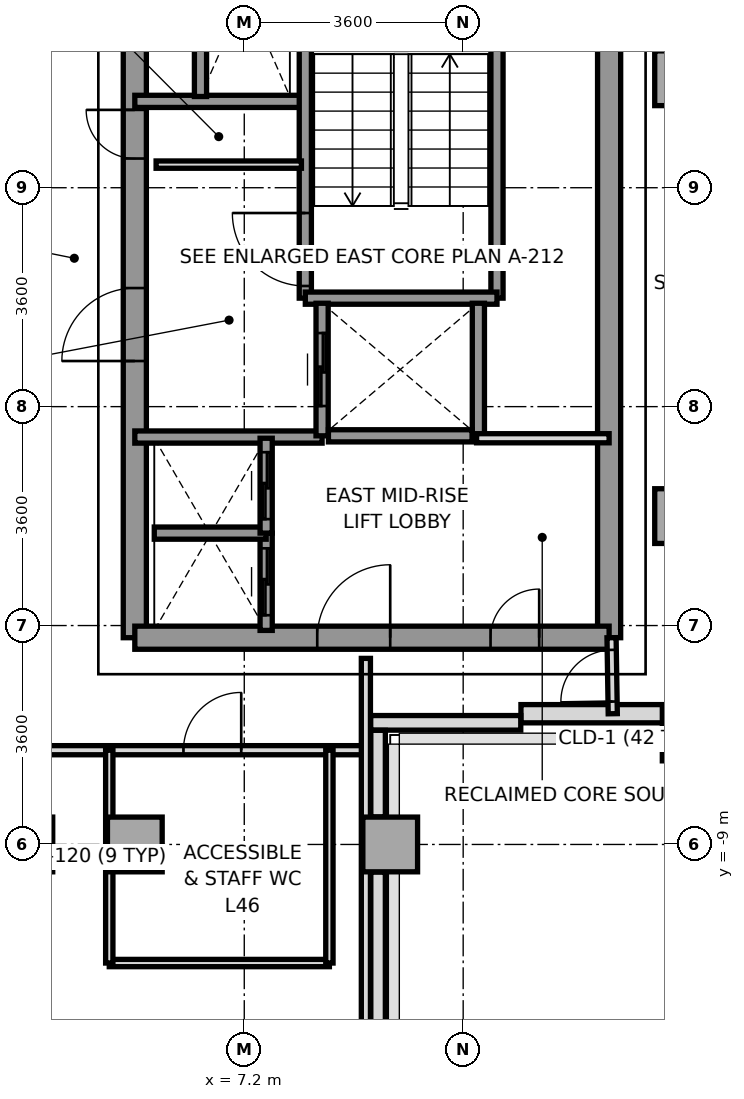
"""IFC4 building model, lengths in metres.
Left out: names, types, materials, properties, quantities, classifications, styles, units other than length and angle.
Written with IfcOpenShell. Run it as: python <this file> out.ifc"""

import sys

from ifc_helpers import new_model, si_unit, direction, frame, frame_2d, origin, origin_2d, place, context, subcontext, project, spatial, rectangle, extrude, source, transform, mapped, element, fill, save


model = new_model("IFC4")
c1 = context("Model", 3, precision=1e-05, world=origin(), true_north=direction((0.0, 1.0)))
c2 = subcontext(c1, "Body", "Model", "MODEL_VIEW")
j1 = project(units=[si_unit("LENGTHUNIT", "METRE"), si_unit("PLANEANGLEUNIT", "RADIAN")], contexts=[c1])
p1 = place(None, origin())
s1 = spatial("IfcSite", under=j1, at=p1, CompositionType="ELEMENT")
p2 = place(p1, origin())
s2 = spatial("IfcBuilding", under=s1, at=p2, CompositionType="ELEMENT")
p3 = place(p2, frame((0.0, 0.0, 170.6)))
s3 = spatial("IfcBuildingStorey", under=s2, at=p3, CompositionType="ELEMENT", Elevation=170.6)
m1 = source(origin(), c2, "Body", "SweptSolid", [
    extrude(rectangle(XDim=0.9, YDim=0.9, at=origin_2d()), origin(), (0.0, 0.0, 1.0), 3.2),
])
for number, where, z_axis, x_axis in (
    (1, (5.4, -9.0, 0.0), (0.0, 0.0, 1.0), (1.0, 0.0, 0.0)),
    (2, (9.6, -9.0, 0.0), (0.0, 0.0, 1.0), (1.0, 0.0, 0.0)),
):
    element("IfcColumn", number, at=place(p3, frame(where, z_axis=z_axis, x_axis=x_axis)), inside=s3, PredefinedType="COLUMN", context=c2, shape_type="MappedRepresentation", body=[
        mapped(m1, transform((0.0, 0.0, 0.0), x_axis=(1.0, 0.0, 0.0), y_axis=(0.0, 1.0, 0.0), z_axis=(0.0, 0.0, 1.0), scale=1.0)),
    ])
m2 = source(origin(), c2, "Body", "SweptSolid", [
    extrude(rectangle(XDim=0.65, YDim=0.85, at=origin_2d()), origin(), (0.0, 0.0, 1.0), 3.2),
])
p4 = place(p3, frame((14.4, -7.2, 0.0), z_axis=(0.0, 0.0, 1.0), x_axis=(1.0, 0.0, 0.0)))
e3 = element("IfcColumn", 3, at=p4, inside=s3, PredefinedType="COLUMN", context=c2, shape_type="MappedRepresentation", body=[
    mapped(m2, transform((0.0, 0.0, 0.0), x_axis=(1.0, 0.0, 0.0), y_axis=(0.0, 1.0, 0.0), z_axis=(0.0, 0.0, 1.0), scale=1.0)),
])
for number, where, z_axis, x_axis in (
    (4, (14.4, -3.6, 0.0), (0.0, 0.0, 1.0), (1.0, 0.0, 0.0)),
    (5, (14.4, 3.6, 0.0), (0.0, 0.0, 1.0), (1.0, 0.0, 0.0)),
):
    element("IfcColumn", number, at=place(p3, frame(where, z_axis=z_axis, x_axis=x_axis)), inside=s3, PredefinedType="COLUMN", context=c2, shape_type="MappedRepresentation", body=[
        mapped(m1, transform((0.0, 0.0, 0.0), x_axis=(1.0, 0.0, 0.0), y_axis=(0.0, 1.0, 0.0), z_axis=(0.0, 0.0, 1.0), scale=1.0)),
    ])
p5 = place(p3, frame((11.75, -6.85, 0.0), z_axis=(0.0, 0.0, 1.0), x_axis=(1.0, 0.0, 0.0)))
e6 = element("IfcWall", 6, at=p5, inside=s3, PredefinedType="SOLIDWALL", context=c2, shape_type="SweptSolid", body=[
    extrude(rectangle(XDim=2.333, YDim=0.3, at=frame_2d((1.167, 0.0))), origin(), (0.0, 0.0, 1.0), 3.2),
])
p6 = place(p3, frame((11.747, -7.0, 0.0), z_axis=(0.0, 0.0, 1.0), x_axis=(-1.0, 0.0, 0.0)))
e7 = element("IfcWall", 7, at=p6, inside=s3, PredefinedType="PARAPET", context=c2, shape_type="SweptSolid", body=[
    extrude(rectangle(XDim=2.469, YDim=0.24, at=frame_2d((1.234, 0.0))), origin(), (0.0, 0.0, 1.0), 1.15),
])
p7 = place(p3, frame((9.4, -7.123, 0.0), z_axis=(0.0, 0.0, 1.0), x_axis=(0.0, -1.0, 0.0)))
e8 = element("IfcWall", 8, at=p7, inside=s3, PredefinedType="PARAPET", context=c2, shape_type="SweptSolid", body=[
    extrude(rectangle(XDim=1.424, YDim=0.24, at=frame_2d((0.712, 0.0))), origin(), (0.0, 0.0, 1.0), 1.15),
])
p8 = place(p3, frame((9.4, -9.453, 0.0), z_axis=(0.0, 0.0, 1.0), x_axis=(0.0, -1.0, 0.0)))
e9 = element("IfcWall", 9, at=p8, inside=s3, PredefinedType="PARAPET", context=c2, shape_type="SweptSolid", body=[
    extrude(rectangle(XDim=6.15, YDim=0.24, at=frame_2d((3.075, 0.0))), origin(), (0.0, 0.0, 1.0), 1.15),
])
p9 = place(p3, frame((13.2, -5.6, 0.0), z_axis=(0.0, 0.0, 1.0), x_axis=(0.0, 1.0, 0.0)))
e10 = element("IfcWall", 10, at=p9, inside=s3, PredefinedType="SHEAR", context=c2, shape_type="SweptSolid", body=[
    extrude(rectangle(XDim=11.2, YDim=0.38, at=frame_2d((5.6, 0.0))), origin(), (0.0, 0.0, 1.0), 3.2),
])
p10 = place(p3, frame((5.4, -5.6, 0.0), z_axis=(0.0, 0.0, 1.0), x_axis=(0.0, 1.0, 0.0)))
e11 = element("IfcWall", 11, at=p10, inside=s3, PredefinedType="SHEAR", context=c2, shape_type="SweptSolid", body=[
    extrude(rectangle(XDim=12.5, YDim=0.38, at=frame_2d((6.25, 0.0))), origin(), (0.0, 0.0, 1.0), 3.2),
])
p11 = place(p10, frame((4.55, 0.0, 0.0)))
e12 = element("IfcOpeningElement", 12, at=p11, cuts=e11, PredefinedType="OPENING", context=c2, shape_type="SweptSolid", body=[
    extrude(rectangle(XDim=1.2, YDim=2.2, at=frame_2d((0.6, 1.1))), frame((0.0, 0.2, 0.0), z_axis=(0.0, -1.0, 0.0), x_axis=(1.0, 0.0, 0.0)), (0.0, 0.0, 1.0), 0.4),
])
p12 = place(p10, frame((7.88, 0.0, 0.0)))
e13 = element("IfcOpeningElement", 13, at=p12, cuts=e11, PredefinedType="OPENING", context=c2, shape_type="SweptSolid", body=[
    extrude(rectangle(XDim=0.8, YDim=2.1, at=frame_2d((0.4, 1.05))), frame((0.0, 0.2, 0.0), z_axis=(0.0, -1.0, 0.0), x_axis=(1.0, 0.0, 0.0)), (0.0, 0.0, 1.0), 0.4),
])
p13 = place(p3, frame((5.4, -5.6, 0.0), z_axis=(0.0, 0.0, 1.0), x_axis=(1.0, 0.0, 0.0)))
e14 = element("IfcWall", 14, at=p13, inside=s3, PredefinedType="SHEAR", context=c2, shape_type="SweptSolid", body=[
    extrude(rectangle(XDim=7.8, YDim=0.38, at=frame_2d((3.9, 0.0))), origin(), (0.0, 0.0, 1.0), 3.2),
])
p14 = place(p13, frame((3.0, 0.0, 0.0)))
e15 = element("IfcOpeningElement", 15, at=p14, cuts=e14, PredefinedType="OPENING", context=c2, shape_type="SweptSolid", body=[
    extrude(rectangle(XDim=1.2, YDim=2.2, at=frame_2d((0.6, 1.1))), frame((0.0, 0.2, 0.0), z_axis=(0.0, -1.0, 0.0), x_axis=(1.0, 0.0, 0.0)), (0.0, 0.0, 1.0), 0.4),
])
p15 = place(p13, frame((5.85, 0.0, 0.0)))
e16 = element("IfcOpeningElement", 16, at=p15, cuts=e14, PredefinedType="OPENING", context=c2, shape_type="SweptSolid", body=[
    extrude(rectangle(XDim=0.8, YDim=2.1, at=frame_2d((0.4, 1.05))), frame((0.0, 0.2, 0.0), z_axis=(0.0, -1.0, 0.0), x_axis=(1.0, 0.0, 0.0)), (0.0, 0.0, 1.0), 0.4),
])
p16 = place(p3, frame((5.4, 3.22, 0.0), z_axis=(0.0, 0.0, 1.0), x_axis=(1.0, 0.0, 0.0)))
e17 = element("IfcWall", 17, at=p16, inside=s3, PredefinedType="SOLIDWALL", context=c2, shape_type="SweptSolid", body=[
    extrude(rectangle(XDim=2.78, YDim=0.2, at=frame_2d((1.39, 0.0))), origin(), (0.0, 0.0, 1.0), 3.2),
])
p17 = place(p3, frame((5.4, -2.3, 0.0), z_axis=(0.0, 0.0, 1.0), x_axis=(1.0, 0.0, 0.0)))
e18 = element("IfcWall", 18, at=p17, inside=s3, PredefinedType="SOLIDWALL", context=c2, shape_type="SweptSolid", body=[
    extrude(rectangle(XDim=3.08, YDim=0.2, at=frame_2d((1.54, 0.0))), origin(), (0.0, 0.0, 1.0), 3.2),
])
p18 = place(p3, frame((8.204, -0.016, 0.0), z_axis=(0.0, 0.0, 1.0), x_axis=(0.0, 1.0, 0.0)))
e19 = element("IfcWall", 19, at=p18, inside=s3, PredefinedType="SOLIDWALL", context=c2, shape_type="SweptSolid", body=[
    extrude(rectangle(XDim=6.916, YDim=0.2, at=frame_2d((3.458, 0.0))), origin(), (0.0, 0.0, 1.0), 3.2),
])
p19 = place(p18, frame((0.2, 0.0, 0.0)))
e20 = element("IfcOpeningElement", 20, at=p19, cuts=e19, PredefinedType="OPENING", context=c2, shape_type="SweptSolid", body=[
    extrude(rectangle(XDim=1.2, YDim=2.2, at=frame_2d((0.6, 1.1))), frame((0.0, 0.11, 0.0), z_axis=(0.0, -1.0, 0.0), x_axis=(1.0, 0.0, 0.0)), (0.0, 0.0, 1.0), 0.22),
])
p20 = place(p3, frame((11.356, -0.016, 0.0), z_axis=(0.0, 0.0, 1.0), x_axis=(0.0, 1.0, 0.0)))
e21 = element("IfcWall", 21, at=p20, inside=s3, PredefinedType="SOLIDWALL", context=c2, shape_type="SweptSolid", body=[
    extrude(rectangle(XDim=6.916, YDim=0.2, at=frame_2d((3.458, 0.0))), origin(), (0.0, 0.0, 1.0), 3.2),
])
p21 = place(p3, frame((8.204, -0.016, 0.0), z_axis=(0.0, 0.0, 1.0), x_axis=(1.0, 0.0, 0.0)))
e22 = element("IfcWall", 22, at=p21, inside=s3, PredefinedType="SOLIDWALL", context=c2, shape_type="SweptSolid", body=[
    extrude(rectangle(XDim=3.152, YDim=0.2, at=frame_2d((1.576, 0.0))), origin(), (0.0, 0.0, 1.0), 3.2),
])
p22 = place(p3, frame((8.48, -2.28, 0.0), z_axis=(0.0, 0.0, 1.0), x_axis=(0.0, 1.0, 0.0)))
e23 = element("IfcWall", 23, at=p22, inside=s3, PredefinedType="SOLIDWALL", context=c2, shape_type="SweptSolid", body=[
    extrude(rectangle(XDim=2.18, YDim=0.2, at=frame_2d((1.09, 0.0))), origin(), (0.0, 0.0, 1.0), 3.2),
])
p23 = place(p22, frame((0.49, 0.0, 0.0)))
e24 = element("IfcOpeningElement", 24, at=p23, cuts=e23, PredefinedType="OPENING", context=c2, shape_type="SweptSolid", body=[
    extrude(rectangle(XDim=1.2, YDim=2.2, at=frame_2d((0.6, 1.1))), frame((0.0, 0.11, 0.0), z_axis=(0.0, -1.0, 0.0), x_axis=(1.0, 0.0, 0.0)), (0.0, 0.0, 1.0), 0.22),
])
p24 = place(p3, frame((11.05, -2.28, 0.0), z_axis=(0.0, 0.0, 1.0), x_axis=(0.0, 1.0, 0.0)))
e25 = element("IfcWall", 25, at=p24, inside=s3, PredefinedType="SOLIDWALL", context=c2, shape_type="SweptSolid", body=[
    extrude(rectangle(XDim=2.18, YDim=0.2, at=frame_2d((1.09, 0.0))), origin(), (0.0, 0.0, 1.0), 3.2),
])
p25 = place(p3, frame((8.584, -2.28, 0.0), z_axis=(0.0, 0.0, 1.0), x_axis=(1.0, 0.0, 0.0)))
e26 = element("IfcWall", 26, at=p25, inside=s3, PredefinedType="SOLIDWALL", context=c2, shape_type="SweptSolid", body=[
    extrude(rectangle(XDim=2.362, YDim=0.2, at=frame_2d((1.181, 0.0))), origin(), (0.0, 0.0, 1.0), 3.2),
])
p26 = place(p3, frame((7.56, -5.48, 0.0), z_axis=(0.0, 0.0, 1.0), x_axis=(0.0, 1.0, 0.0)))
e27 = element("IfcWall", 27, at=p26, inside=s3, PredefinedType="SOLIDWALL", context=c2, shape_type="SweptSolid", body=[
    extrude(rectangle(XDim=1.6, YDim=0.2, at=frame_2d((0.8, 0.0))), origin(), (0.0, 0.0, 1.0), 3.2),
])
p27 = place(p26, frame((0.25, 0.0, 0.0)))
e28 = element("IfcOpeningElement", 28, at=p27, cuts=e27, PredefinedType="OPENING", context=c2, shape_type="SweptSolid", body=[
    extrude(rectangle(XDim=1.1, YDim=2.2, at=frame_2d((0.55, 1.1))), frame((0.0, 0.11, 0.0), z_axis=(0.0, -1.0, 0.0), x_axis=(1.0, 0.0, 0.0)), (0.0, 0.0, 1.0), 0.22),
])
p28 = place(p3, frame((5.72, -3.88, 0.0), z_axis=(0.0, 0.0, 1.0), x_axis=(1.0, 0.0, 0.0)))
e29 = element("IfcWall", 29, at=p28, inside=s3, PredefinedType="SOLIDWALL", context=c2, shape_type="SweptSolid", body=[
    extrude(rectangle(XDim=1.84, YDim=0.2, at=frame_2d((0.92, 0.0))), origin(), (0.0, 0.0, 1.0), 3.2),
])
p29 = place(p3, frame((7.56, -3.88, 0.0), z_axis=(0.0, 0.0, 1.0), x_axis=(0.0, 1.0, 0.0)))
e30 = element("IfcWall", 30, at=p29, inside=s3, PredefinedType="SOLIDWALL", context=c2, shape_type="SweptSolid", body=[
    extrude(rectangle(XDim=1.56, YDim=0.2, at=frame_2d((0.78, 0.0))), origin(), (0.0, 0.0, 1.0), 3.2),
])
p30 = place(p29, frame((0.23, 0.0, 0.0)))
e31 = element("IfcOpeningElement", 31, at=p30, cuts=e30, PredefinedType="OPENING", context=c2, shape_type="SweptSolid", body=[
    extrude(rectangle(XDim=1.1, YDim=2.2, at=frame_2d((0.55, 1.1))), frame((0.0, 0.11, 0.0), z_axis=(0.0, -1.0, 0.0), x_axis=(1.0, 0.0, 0.0)), (0.0, 0.0, 1.0), 0.22),
])
p31 = place(p3, frame((6.48, 3.3, 0.0), z_axis=(0.0, 0.0, 1.0), x_axis=(0.0, 1.0, 0.0)))
e32 = element("IfcWall", 32, at=p31, inside=s3, PredefinedType="SOLIDWALL", context=c2, shape_type="SweptSolid", body=[
    extrude(rectangle(XDim=1.68, YDim=0.2, at=frame_2d((0.84, 0.0))), origin(), (0.0, 0.0, 1.0), 3.2),
])
p32 = place(p3, frame((5.75, 2.18, 0.0), z_axis=(0.0, 0.0, 1.0), x_axis=(1.0, 0.0, 0.0)))
e33 = element("IfcWall", 33, at=p32, inside=s3, PredefinedType="PARTITIONING", context=c2, shape_type="SweptSolid", body=[
    extrude(rectangle(XDim=2.39, YDim=0.12, at=frame_2d((1.195, 0.0))), origin(), (0.0, 0.0, 1.0), 2.3),
])
p33 = place(p3, frame((11.02, -2.32, 0.0), z_axis=(0.0, 0.0, 1.0), x_axis=(1.0, 0.0, 0.0)))
e34 = element("IfcWall", 34, at=p33, inside=s3, PredefinedType="PARTITIONING", context=c2, shape_type="SweptSolid", body=[
    extrude(rectangle(XDim=2.18, YDim=0.15, at=frame_2d((1.09, 0.0))), origin(), (0.0, 0.0, 1.0), 3.2),
])
p34 = place(p3, frame((-9.2, -7.45, 0.0), z_axis=(0.0, 0.0, 1.0), x_axis=(1.0, 0.0, 0.0)))
e35 = element("IfcWall", 35, at=p34, inside=s3, PredefinedType="PARTITIONING", context=c2, shape_type="SweptSolid", body=[
    extrude(rectangle(XDim=18.4, YDim=0.15, at=frame_2d((9.2, 0.0))), origin(), (0.0, 0.0, 1.0), 2.8),
])
p35 = place(p34, frame((15.4, 0.0, 0.0)))
e36 = element("IfcOpeningElement", 36, at=p35, cuts=e35, PredefinedType="OPENING", context=c2, shape_type="SweptSolid", body=[
    extrude(rectangle(XDim=0.95, YDim=2.15, at=frame_2d((0.475, 1.075))), frame((0.0, 0.085, 0.0), z_axis=(0.0, -1.0, 0.0), x_axis=(1.0, 0.0, 0.0)), (0.0, 0.0, 1.0), 0.17),
])
p36 = place(p34, frame((2.0, 0.0, 0.0)))
e37 = element("IfcOpeningElement", 37, at=p36, cuts=e35, PredefinedType="OPENING", context=c2, shape_type="SweptSolid", body=[
    extrude(rectangle(XDim=0.95, YDim=2.15, at=frame_2d((0.475, 1.075))), frame((0.0, 0.085, 0.0), z_axis=(0.0, -1.0, 0.0), x_axis=(1.0, 0.0, 0.0)), (0.0, 0.0, 1.0), 0.17),
])
p37 = place(p34, frame((10.6, 0.0, 0.0)))
e38 = element("IfcOpeningElement", 38, at=p37, cuts=e35, PredefinedType="OPENING", context=c2, shape_type="SweptSolid", body=[
    extrude(rectangle(XDim=1.1, YDim=2.2, at=frame_2d((0.55, 1.1))), frame((0.0, 0.085, 0.0), z_axis=(0.0, -1.0, 0.0), x_axis=(1.0, 0.0, 0.0)), (0.0, 0.0, 1.0), 0.17),
])
p38 = place(p3, frame((9.2, -15.68, 0.0), z_axis=(0.0, 0.0, 1.0), x_axis=(0.0, 1.0, 0.0)))
e39 = element("IfcWall", 39, at=p38, inside=s3, PredefinedType="PARTITIONING", context=c2, shape_type="SweptSolid", body=[
    extrude(rectangle(XDim=9.74, YDim=0.15, at=frame_2d((4.87, 0.0))), origin(), (0.0, 0.0, 1.0), 2.75),
])
p39 = place(p3, frame((4.98, -10.95, 0.0), z_axis=(0.0, 0.0, 1.0), x_axis=(1.0, 0.0, 0.0)))
e40 = element("IfcWall", 40, at=p39, inside=s3, PredefinedType="PARTITIONING", context=c2, shape_type="SweptSolid", body=[
    extrude(rectangle(XDim=3.62, YDim=0.12, at=frame_2d((1.81, 0.0))), origin(), (0.0, 0.0, 1.0), 3.2),
])
p40 = place(p3, frame((4.98, -10.95, 0.0), z_axis=(0.0, 0.0, 1.0), x_axis=(0.0, 1.0, 0.0)))
e41 = element("IfcWall", 41, at=p40, inside=s3, PredefinedType="PARTITIONING", context=c2, shape_type="SweptSolid", body=[
    extrude(rectangle(XDim=3.5, YDim=0.12, at=frame_2d((1.75, 0.0))), origin(), (0.0, 0.0, 1.0), 3.2),
])
p41 = place(p3, frame((8.6, -10.95, 0.0), z_axis=(0.0, 0.0, 1.0), x_axis=(0.0, 1.0, 0.0)))
e42 = element("IfcWall", 42, at=p41, inside=s3, PredefinedType="PARTITIONING", context=c2, shape_type="SweptSolid", body=[
    extrude(rectangle(XDim=3.5, YDim=0.12, at=frame_2d((1.75, 0.0))), origin(), (0.0, 0.0, 1.0), 2.75),
])
p42 = place(p3, frame((13.26, -6.85, 0.0), z_axis=(0.0, 0.0, 1.0), x_axis=(-0.016013571389, 0.999871774545, 0.0)))
e43 = element("IfcWall", 43, at=p42, inside=s3, PredefinedType="PARTITIONING", context=c2, shape_type="SweptSolid", body=[
    extrude(rectangle(XDim=1.25, YDim=0.15, at=frame_2d((0.625, 0.0))), origin(), (0.0, 0.0, 1.0), 3.2),
])
p43 = place(p42, frame((0.2, 0.0, 0.0)))
e44 = element("IfcOpeningElement", 44, at=p43, cuts=e43, PredefinedType="OPENING", context=c2, shape_type="SweptSolid", body=[
    extrude(rectangle(XDim=0.85, YDim=2.1, at=frame_2d((0.425, 1.05))), frame((0.0, 0.085, 0.0), z_axis=(0.0, -1.0, 0.0), x_axis=(1.0, 0.0, 0.0)), (0.0, 0.0, 1.0), 0.17),
])
m3 = source(origin(), c2, "Body", "SweptSolid", [
    extrude(rectangle(XDim=1.2, YDim=2.2, at=frame_2d((0.6, 1.1))), frame((0.0, 0.025, 0.0), z_axis=(0.0, -1.0, 0.0), x_axis=(1.0, 0.0, 0.0)), (0.0, 0.0, 1.0), 0.05),
])
p44 = place(p19, origin())
e45 = element("IfcDoor", 45, at=p44, inside=s3, OperationType="SINGLE_SWING_RIGHT", PredefinedType="DOOR", context=c2, shape_type="MappedRepresentation", body=[
    mapped(m3, transform((0.0, 0.0, 0.0), x_axis=(1.0, 0.0, 0.0), y_axis=(0.0, 1.0, 0.0), z_axis=(0.0, 0.0, 1.0), scale=1.0)),
])
fill(e20, e45)
p45 = place(p11, origin())
e46 = element("IfcDoor", 46, at=p45, inside=s3, OperationType="SINGLE_SWING_LEFT", PredefinedType="DOOR", context=c2, shape_type="MappedRepresentation", body=[
    mapped(m3, transform((0.0, 0.0, 0.0), x_axis=(1.0, 0.0, 0.0), y_axis=(0.0, 1.0, 0.0), z_axis=(0.0, 0.0, 1.0), scale=1.0)),
])
fill(e12, e46)
p46 = place(p14, origin())
e47 = element("IfcDoor", 47, at=p46, inside=s3, OperationType="SINGLE_SWING_RIGHT", PredefinedType="DOOR", context=c2, shape_type="MappedRepresentation", body=[
    mapped(m3, transform((0.0, 0.0, 0.0), x_axis=(1.0, 0.0, 0.0), y_axis=(0.0, 1.0, 0.0), z_axis=(0.0, 0.0, 1.0), scale=1.0)),
])
fill(e15, e47)
m4 = source(origin(), c2, "Body", "SweptSolid", [
    extrude(rectangle(XDim=0.8, YDim=2.1, at=frame_2d((0.4, 1.05))), frame((0.0, 0.025, 0.0), z_axis=(0.0, -1.0, 0.0), x_axis=(1.0, 0.0, 0.0)), (0.0, 0.0, 1.0), 0.05),
])
p47 = place(p12, origin())
e48 = element("IfcDoor", 48, at=p47, inside=s3, OperationType="SINGLE_SWING_RIGHT", PredefinedType="DOOR", context=c2, shape_type="MappedRepresentation", body=[
    mapped(m4, transform((0.0, 0.0, 0.0), x_axis=(1.0, 0.0, 0.0), y_axis=(0.0, 1.0, 0.0), z_axis=(0.0, 0.0, 1.0), scale=1.0)),
])
fill(e13, e48)
p48 = place(p15, origin())
e49 = element("IfcDoor", 49, at=p48, inside=s3, OperationType="SINGLE_SWING_RIGHT", PredefinedType="DOOR", context=c2, shape_type="MappedRepresentation", body=[
    mapped(m4, transform((0.0, 0.0, 0.0), x_axis=(1.0, 0.0, 0.0), y_axis=(0.0, 1.0, 0.0), z_axis=(0.0, 0.0, 1.0), scale=1.0)),
])
fill(e16, e49)
p49 = place(p23, origin())
e50 = element("IfcDoor", 50, at=p49, inside=s3, OperationType="SLIDING_TO_RIGHT", PredefinedType="DOOR", context=c2, shape_type="MappedRepresentation", body=[
    mapped(m3, transform((0.0, 0.0, 0.0), x_axis=(1.0, 0.0, 0.0), y_axis=(0.0, 1.0, 0.0), z_axis=(0.0, 0.0, 1.0), scale=1.0)),
])
fill(e24, e50)
m5 = source(origin(), c2, "Body", "SweptSolid", [
    extrude(rectangle(XDim=1.1, YDim=2.2, at=frame_2d((0.55, 1.1))), frame((0.0, 0.025, 0.0), z_axis=(0.0, -1.0, 0.0), x_axis=(1.0, 0.0, 0.0)), (0.0, 0.0, 1.0), 0.05),
])
p50 = place(p27, origin())
e51 = element("IfcDoor", 51, at=p50, inside=s3, OperationType="SLIDING_TO_LEFT", PredefinedType="DOOR", context=c2, shape_type="MappedRepresentation", body=[
    mapped(m5, transform((0.0, 0.0, 0.0), x_axis=(1.0, 0.0, 0.0), y_axis=(0.0, 1.0, 0.0), z_axis=(0.0, 0.0, 1.0), scale=1.0)),
])
fill(e28, e51)
p51 = place(p30, origin())
e52 = element("IfcDoor", 52, at=p51, inside=s3, OperationType="SLIDING_TO_LEFT", PredefinedType="DOOR", context=c2, shape_type="MappedRepresentation", body=[
    mapped(m5, transform((0.0, 0.0, 0.0), x_axis=(1.0, 0.0, 0.0), y_axis=(0.0, 1.0, 0.0), z_axis=(0.0, 0.0, 1.0), scale=1.0)),
])
fill(e31, e52)
m6 = source(origin(), c2, "Body", "SweptSolid", [
    extrude(rectangle(XDim=0.95, YDim=2.15, at=frame_2d((0.475, 1.075))), frame((0.0, 0.025, 0.0), z_axis=(0.0, -1.0, 0.0), x_axis=(1.0, 0.0, 0.0)), (0.0, 0.0, 1.0), 0.05),
])
p52 = place(p35, origin())
e53 = element("IfcDoor", 53, at=p52, inside=s3, OperationType="SINGLE_SWING_RIGHT", PredefinedType="DOOR", context=c2, shape_type="MappedRepresentation", body=[
    mapped(m6, transform((0.0, 0.0, 0.0), x_axis=(1.0, 0.0, 0.0), y_axis=(0.0, 1.0, 0.0), z_axis=(0.0, 0.0, 1.0), scale=1.0)),
])
fill(e36, e53)
m7 = source(origin(), c2, "Body", "SweptSolid", [
    extrude(rectangle(XDim=0.85, YDim=2.1, at=frame_2d((0.425, 1.05))), frame((0.0, 0.025, 0.0), z_axis=(0.0, -1.0, 0.0), x_axis=(1.0, 0.0, 0.0)), (0.0, 0.0, 1.0), 0.05),
])
p53 = place(p43, origin())
e54 = element("IfcDoor", 54, at=p53, inside=s3, OperationType="SINGLE_SWING_LEFT", PredefinedType="DOOR", context=c2, shape_type="MappedRepresentation", body=[
    mapped(m7, transform((0.0, 0.0, 0.0), x_axis=(1.0, 0.0, 0.0), y_axis=(0.0, 1.0, 0.0), z_axis=(0.0, 0.0, 1.0), scale=1.0)),
])
fill(e44, e54)
save(model, sys.argv[1])
